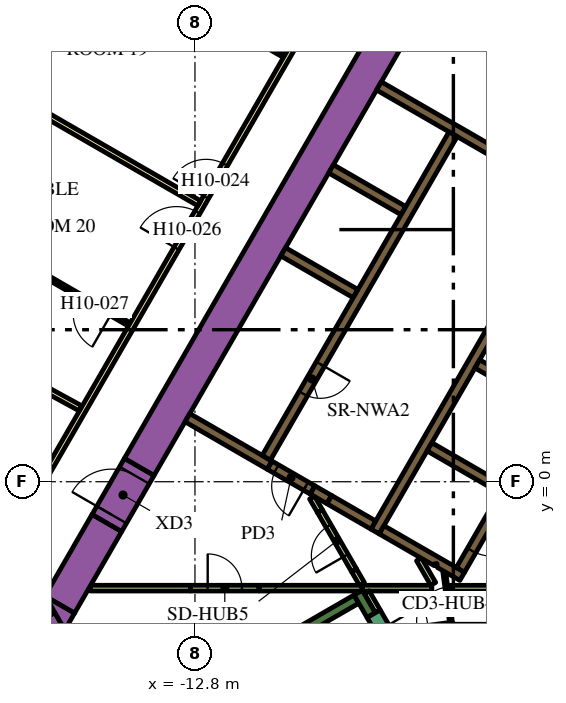
"""IFC4 building model, lengths in metres.
Left out: names, types, materials, properties, quantities, classifications, styles, units other than length and angle.
Written with IfcOpenShell. Run it as: python <this file> out.ifc"""

import sys

from ifc_helpers import new_model, si_unit, direction, frame, frame_2d, origin, place, context, subcontext, project, spatial, polyline, rectangle, outline, extrude, element, fill, save


model = new_model("IFC4")
c1 = context("Model", 3, precision=1e-05, world=origin(), true_north=direction((0.0, 1.0)))
c2 = subcontext(c1, "Body", "Model", "MODEL_VIEW")
j1 = project(units=[si_unit("LENGTHUNIT", "METRE"), si_unit("PLANEANGLEUNIT", "RADIAN")], contexts=[c1])
p1 = place(None, origin())
s1 = spatial("IfcSite", under=j1, at=p1, CompositionType="ELEMENT")
p2 = place(p1, origin())
s2 = spatial("IfcBuilding", under=s1, at=p2, CompositionType="ELEMENT")
p3 = place(p2, frame((0.0, 0.0, 130.5)))
s3 = spatial("IfcBuildingStorey", under=s2, at=p3, CompositionType="ELEMENT", Elevation=130.5)
p4 = place(p3, frame((-14.268, 0.387, 0.0), z_axis=(0.0, 0.0, 1.0), x_axis=(0.499994617707, 0.866028511231, 0.0)))
e1 = element("IfcWall", 1, at=p4, inside=s3, PredefinedType="SOLIDWALL", context=c2, shape_type="SweptSolid", body=[
    extrude(rectangle(XDim=18.817, YDim=0.9, at=frame_2d((9.409, 0.0))), origin(), (0.0, 0.0, 1.0), 3.9),
])
p5 = place(p3, frame((-12.134, -11.883, 0.0), z_axis=(0.0, 0.0, 1.0), x_axis=(-0.500005339912, 0.866022320763, 0.0)))
e2 = element("IfcWall", 2, at=p5, inside=s3, PredefinedType="SOLIDWALL", context=c2, shape_type="SweptSolid", body=[
    extrude(rectangle(XDim=9.488, YDim=0.9, at=frame_2d((4.744, 0.0))), origin(), (0.0, 0.0, 1.0), 3.9),
])
p6 = place(p3, origin())
e3 = element("IfcWall", 3, at=p6, inside=s3, PredefinedType="SOLIDWALL", context=c2, shape_type="SweptSolid", body=[
    extrude(outline(polyline([(-16.489, -3.44), (-17.251, -3.88), (-16.743, -3.0), (-16.489, -3.44)])), origin(), (0.0, 0.0, 1.0), 3.9),
])
p7 = place(p3, frame((-15.118, -1.085, 0.0), z_axis=(0.0, 0.0, 1.0), x_axis=(-0.50006606081, -0.865987260198, 0.0)))
e4 = element("IfcWall", 4, at=p7, inside=s3, PredefinedType="SOLIDWALL", context=c2, shape_type="SweptSolid", body=[
    extrude(rectangle(XDim=2.481, YDim=0.9, at=frame_2d((1.24, 0.0))), origin(), (0.0, 0.0, 1.0), 3.9),
])
e5 = element("IfcWall", 5, at=p6, inside=s3, PredefinedType="SOLIDWALL", context=c2, shape_type="SweptSolid", body=[
    extrude(outline(polyline([(-16.223, -3.9), (-16.732, -3.02), (-15.969, -3.46), (-16.223, -3.9)])), origin(), (0.0, 0.0, 1.0), 3.9),
])
p8 = place(p3, frame((-14.44, -6.49, 0.0), z_axis=(0.0, 0.0, 1.0), x_axis=(0.866022966069, 0.500004222222, 0.0)))
e6 = element("IfcWall", 6, at=p8, inside=s3, PredefinedType="SOLIDWALL", context=c2, shape_type="SweptSolid", body=[
    extrude(rectangle(XDim=6.8, YDim=0.25, at=frame_2d((3.4, 0.0))), origin(), (0.0, 0.0, 1.0), 3.9),
])
p9 = place(p3, frame((-8.163, -3.511, 0.0), z_axis=(0.0, 0.0, 1.0), x_axis=(-0.500206266495, 0.865906283012, 0.0)))
e7 = element("IfcWall", 7, at=p9, inside=s3, PredefinedType="SOLIDWALL", context=c2, shape_type="SweptSolid", body=[
    extrude(rectangle(XDim=0.684, YDim=0.25, at=frame_2d((0.342, 0.0))), origin(), (0.0, 0.0, 1.0), 3.9),
])
p10 = place(p3, frame((-8.06, -1.311, 0.0), z_axis=(0.0, 0.0, 1.0), x_axis=(0.50000273126, 0.866023826885, 0.0)))
e8 = element("IfcWall", 8, at=p10, inside=s3, PredefinedType="SOLIDWALL", context=c2, shape_type="SweptSolid", body=[
    extrude(rectangle(XDim=10.33, YDim=0.25, at=frame_2d((5.165, 0.0))), origin(), (0.0, 0.0, 1.0), 3.9),
])
for number, where, z_axis, x_axis in (
    (9, (-5.369, 3.1, 0.0), (0.0, 0.0, 1.0), (0.866, -0.5, 0.0)),
    (10, (-4.724, -0.182, 0.0), (0.0, 0.0, 1.0), (-0.866, 0.5, 0.0)),
):
    element("IfcWall", number, at=place(p3, frame(where, z_axis=z_axis, x_axis=x_axis)), inside=s3, PredefinedType="SOLIDWALL", context=c2, shape_type="SweptSolid", body=[
        extrude(rectangle(XDim=2.2, YDim=0.25, at=frame_2d((1.1, 0.0))), origin(), (0.0, 0.0, 1.0), 3.9),
    ])
e11 = element("IfcWall", 11, at=p6, inside=s3, PredefinedType="SOLIDWALL", context=c2, shape_type="SweptSolid", body=[
    extrude(outline(polyline([(-5.922, -2.257), (-5.922, -2.257), (-5.705, -2.382), (-5.83, -2.598), (-6.418, -2.258), (-6.433, -2.153), (-6.433, -2.153), (-6.433, -2.153), (-6.508, -2.163), (-6.508, -2.163), (-6.508, -2.163), (-6.501, -2.21), (-7.952, -1.373), (-7.827, -1.156), (-5.922, -2.257)])), origin(), (0.0, 0.0, 1.0), 3.9),
])
p11 = place(p3, frame((-9.708, -0.215, 0.0), z_axis=(0.0, 0.0, 1.0), x_axis=(0.866113839764, -0.499846793097, 0.0)))
e12 = element("IfcWall", 12, at=p11, inside=s3, PredefinedType="SOLIDWALL", context=c2, shape_type="SweptSolid", body=[
    extrude(rectangle(XDim=0.51, YDim=0.25, at=frame_2d((0.255, 0.0))), origin(), (0.0, 0.0, 1.0), 3.9),
])
p12 = place(p3, frame((-12.999, 1.685, 0.0), z_axis=(0.0, 0.0, 1.0), x_axis=(0.865996765544, -0.500049599607, 0.0)))
e13 = element("IfcWall", 13, at=p12, inside=s3, PredefinedType="SOLIDWALL", context=c2, shape_type="SweptSolid", body=[
    extrude(rectangle(XDim=2.498, YDim=0.25, at=frame_2d((1.249, 0.0))), origin(), (0.0, 0.0, 1.0), 3.9),
])
p13 = place(p3, frame((-9.265, -0.471, 0.0), z_axis=(0.0, 0.0, 1.0), x_axis=(0.865954634268, -0.500122556369, 0.0)))
e14 = element("IfcWall", 14, at=p13, inside=s3, PredefinedType="SOLIDWALL", context=c2, shape_type="SweptSolid", body=[
    extrude(rectangle(XDim=1.338, YDim=0.25, at=frame_2d((0.669, 0.0))), origin(), (0.0, 0.0, 1.0), 3.9),
])
for number, where, z_axis, x_axis in (
    (15, (-8.574, 4.95, 0.0), (0.0, 0.0, 1.0), (-0.866, 0.5, 0.0)),
    (16, (-7.314, 7.132, 0.0), (0.0, 0.0, 1.0), (-0.866, 0.5, 0.0)),
):
    element("IfcWall", number, at=place(p3, frame(where, z_axis=z_axis, x_axis=x_axis)), inside=s3, PredefinedType="SOLIDWALL", context=c2, shape_type="SweptSolid", body=[
        extrude(rectangle(XDim=2.2, YDim=0.25, at=frame_2d((1.1, 0.0))), origin(), (0.0, 0.0, 1.0), 3.9),
    ])
p14 = place(p3, frame((-7.959, 10.415, 0.0), z_axis=(0.0, 0.0, 1.0), x_axis=(0.866020958405, -0.500007699544, 0.0)))
e17 = element("IfcWall", 17, at=p14, inside=s3, PredefinedType="SOLIDWALL", context=c2, shape_type="SweptSolid", body=[
    extrude(rectangle(XDim=4.1, YDim=0.25, at=frame_2d((2.05, 0.0))), origin(), (0.0, 0.0, 1.0), 3.9),
])
p15 = place(p3, frame((-12.915, -2.8, 0.0), z_axis=(0.0, 0.0, 1.0), x_axis=(-1.0, 0.0, 0.0)))
e18 = element("IfcWall", 18, at=p15, inside=s3, PredefinedType="PARTITIONING", context=c2, shape_type="SweptSolid", body=[
    extrude(rectangle(XDim=2.637, YDim=0.15, at=frame_2d((1.318, 0.0))), origin(), (0.0, 0.0, 1.0), 2.6),
])
p16 = place(p3, frame((-8.395, -2.8, 0.0), z_axis=(0.0, 0.0, 1.0), x_axis=(1.0, 0.0, 0.0)))
e19 = element("IfcWall", 19, at=p16, inside=s3, PredefinedType="PARTITIONING", context=c2, shape_type="SweptSolid", body=[
    extrude(rectangle(XDim=1.828, YDim=0.15, at=frame_2d((0.914, 0.0))), origin(), (0.0, 0.0, 1.0), 2.6),
])
p17 = place(p3, frame((-11.115, -2.8, 0.0), z_axis=(0.0, 0.0, 1.0), x_axis=(1.0, 0.0, 0.0)))
e20 = element("IfcWall", 20, at=p17, inside=s3, PredefinedType="PARTITIONING", context=c2, shape_type="SweptSolid", body=[
    extrude(rectangle(XDim=2.708, YDim=0.15, at=frame_2d((1.354, 0.0))), origin(), (0.0, 0.0, 1.0), 2.6),
])
p18 = place(p3, frame((-6.531, -2.689, 0.0), z_axis=(0.0, 0.0, 1.0), x_axis=(-0.499967446111, 0.866044197965, 0.0)))
e21 = element("IfcWall", 21, at=p18, inside=s3, PredefinedType="PARTITIONING", context=c2, shape_type="SweptSolid", body=[
    extrude(rectangle(XDim=0.748, YDim=0.15, at=frame_2d((0.374, 0.0))), origin(), (0.0, 0.0, 1.0), 2.6),
])
p19 = place(p3, frame((-7.99, -3.412, 0.0), z_axis=(0.0, 0.0, 1.0), x_axis=(-0.500193841991, 0.86591346013, 0.0)))
e22 = element("IfcWall", 22, at=p19, inside=s3, PredefinedType="PARTITIONING", context=c2, shape_type="SweptSolid", body=[
    extrude(rectangle(XDim=0.583, YDim=0.15, at=frame_2d((0.292, 0.0))), origin(), (0.0, 0.0, 1.0), 2.6),
])
p20 = place(p3, frame((-8.612, -2.333, 0.0), z_axis=(0.0, 0.0, 1.0), x_axis=(0.500248216681, -0.86588204838, 0.0)))
e23 = element("IfcWall", 23, at=p20, inside=s3, PredefinedType="PARTITIONING", context=c2, shape_type="SweptSolid", body=[
    extrude(rectangle(XDim=0.415, YDim=0.15, at=frame_2d((0.208, 0.0))), origin(), (0.0, 0.0, 1.0), 2.6),
])
p21 = place(p3, frame((-6.086, -2.801, 0.0), z_axis=(0.0, 0.0, 1.0), x_axis=(1.0, 0.0, 0.0)))
e24 = element("IfcWall", 24, at=p21, inside=s3, PredefinedType="PARTITIONING", context=c2, shape_type="SweptSolid", body=[
    extrude(rectangle(XDim=7.524, YDim=0.15, at=frame_2d((3.762, 0.0))), origin(), (0.0, 0.0, 1.0), 2.6),
])
p22 = place(p3, frame((-9.512, -0.775, 0.0), z_axis=(0.0, 0.0, 1.0), x_axis=(-0.500080620599, 0.865978852456, 0.0)))
e25 = element("IfcWall", 25, at=p22, inside=s3, PredefinedType="PARTITIONING", context=c2, shape_type="SweptSolid", body=[
    extrude(rectangle(XDim=0.413, YDim=0.15, at=frame_2d((0.207, 0.0))), origin(), (0.0, 0.0, 1.0), 2.6),
])
p23 = place(p3, frame((-6.008, 9.144, 0.0), z_axis=(0.0, 0.0, 1.0), x_axis=(-0.500006956611, -0.866021387346, 0.0)))
e26 = element("IfcWall", 26, at=p23, inside=s3, PredefinedType="SOLIDWALL", context=c2, shape_type="SweptSolid", body=[
    extrude(rectangle(XDim=9.83, YDim=0.25, at=frame_2d((4.915, 0.0))), origin(), (0.0, 0.0, 1.0), 3.9),
])
p24 = place(p23, frame((6.985, 0.0, 0.0)))
e27 = element("IfcOpeningElement", 27, at=p24, cuts=e26, PredefinedType="OPENING", context=c2, shape_type="SweptSolid", body=[
    extrude(rectangle(XDim=0.9, YDim=2.1, at=frame_2d((0.45, 1.05))), frame((0.0, 0.135, 0.0), z_axis=(0.0, -1.0, 0.0), x_axis=(1.0, 0.0, 0.0)), (0.0, 0.0, 1.0), 0.27),
])
p25 = place(p3, frame((-0.898, 6.194, 0.0), z_axis=(0.0, 0.0, 1.0), x_axis=(-0.499996202215, -0.866027596426, 0.0)))
e28 = element("IfcWall", 28, at=p25, inside=s3, PredefinedType="SOLIDWALL", context=c2, shape_type="SweptSolid", body=[
    extrude(rectangle(XDim=9.83, YDim=0.25, at=frame_2d((4.915, 0.0))), origin(), (0.0, 0.0, 1.0), 3.9),
])
p26 = place(p25, frame((0.585, 0.0, 0.0)))
e29 = element("IfcOpeningElement", 29, at=p26, cuts=e28, PredefinedType="OPENING", context=c2, shape_type="SweptSolid", body=[
    extrude(rectangle(XDim=1.1, YDim=2.1, at=frame_2d((0.55, 1.05))), frame((0.0, 0.135, 0.0), z_axis=(0.0, -1.0, 0.0), x_axis=(1.0, 0.0, 0.0)), (0.0, 0.0, 1.0), 0.27),
])
p27 = place(p25, frame((3.105, 0.0, 0.0)))
e30 = element("IfcOpeningElement", 30, at=p27, cuts=e28, PredefinedType="OPENING", context=c2, shape_type="SweptSolid", body=[
    extrude(rectangle(XDim=1.1, YDim=2.1, at=frame_2d((0.55, 1.05))), frame((0.0, 0.135, 0.0), z_axis=(0.0, -1.0, 0.0), x_axis=(1.0, 0.0, 0.0)), (0.0, 0.0, 1.0), 0.27),
])
p28 = place(p25, frame((5.625, 0.0, 0.0)))
e31 = element("IfcOpeningElement", 31, at=p28, cuts=e28, PredefinedType="OPENING", context=c2, shape_type="SweptSolid", body=[
    extrude(rectangle(XDim=1.1, YDim=2.1, at=frame_2d((0.55, 1.05))), frame((0.0, 0.135, 0.0), z_axis=(0.0, -1.0, 0.0), x_axis=(1.0, 0.0, 0.0)), (0.0, 0.0, 1.0), 0.27),
])
p29 = place(p25, frame((8.145, 0.0, 0.0)))
e32 = element("IfcOpeningElement", 32, at=p29, cuts=e28, PredefinedType="OPENING", context=c2, shape_type="SweptSolid", body=[
    extrude(rectangle(XDim=1.1, YDim=2.1, at=frame_2d((0.55, 1.05))), frame((0.0, 0.135, 0.0), z_axis=(0.0, -1.0, 0.0), x_axis=(1.0, 0.0, 0.0)), (0.0, 0.0, 1.0), 0.27),
])
p30 = place(p3, frame((-8.098, -3.474, 0.0), z_axis=(0.0, 0.0, 1.0), x_axis=(0.49994051562, -0.866059744384, 0.0)))
e33 = element("IfcWall", 33, at=p30, inside=s3, PredefinedType="SOLIDWALL", context=c2, shape_type="SweptSolid", body=[
    extrude(rectangle(XDim=2.1, YDim=0.4, at=frame_2d((1.05, 0.0))), origin(), (0.0, 0.0, 1.0), 3.9),
])
p31 = place(p30, frame((0.45, 0.0, 0.0)))
e34 = element("IfcOpeningElement", 34, at=p31, cuts=e33, PredefinedType="OPENING", context=c2, shape_type="SweptSolid", body=[
    extrude(rectangle(XDim=1.2, YDim=2.1, at=frame_2d((0.6, 1.05))), frame((0.0, 0.21, 0.0), z_axis=(0.0, -1.0, 0.0), x_axis=(1.0, 0.0, 0.0)), (0.0, 0.0, 1.0), 0.42),
])
p32 = place(p3, frame((-9.708, -0.215, 0.0), z_axis=(0.0, 0.0, 1.0), x_axis=(-0.866004217611, 0.500036693733, 0.0)))
e35 = element("IfcWall", 35, at=p32, inside=s3, PredefinedType="SOLIDWALL", context=c2, shape_type="SweptSolid", body=[
    extrude(rectangle(XDim=1.3, YDim=0.25, at=frame_2d((0.65, 0.0))), origin(), (0.0, 0.0, 1.0), 3.9),
])
p33 = place(p32, frame((0.2, 0.0, 0.0)))
e36 = element("IfcOpeningElement", 36, at=p33, cuts=e35, PredefinedType="OPENING", context=c2, shape_type="SweptSolid", body=[
    extrude(rectangle(XDim=0.9, YDim=2.1, at=frame_2d((0.45, 1.05))), frame((0.0, 0.135, 0.0), z_axis=(0.0, -1.0, 0.0), x_axis=(1.0, 0.0, 0.0)), (0.0, 0.0, 1.0), 0.27),
])
p34 = place(p3, frame((-5.995, -4.213, 0.0), z_axis=(0.0, 0.0, 1.0), x_axis=(-0.132072335448, 0.991240081014, 0.0)))
e37 = element("IfcWall", 37, at=p34, inside=s3, PredefinedType="PARTITIONING", context=c2, shape_type="SweptSolid", body=[
    extrude(rectangle(XDim=2.1, YDim=0.076, at=frame_2d((1.05, 0.0))), origin(), (0.0, 0.0, 1.0), 2.6),
])
p35 = place(p34, frame((0.55, 0.0, 0.0)))
e38 = element("IfcOpeningElement", 38, at=p35, cuts=e37, PredefinedType="OPENING", context=c2, shape_type="SweptSolid", body=[
    extrude(rectangle(XDim=0.9, YDim=2.1, at=frame_2d((0.45, 1.05))), frame((0.0, 0.048, 0.0), z_axis=(0.0, -1.0, 0.0), x_axis=(1.0, 0.0, 0.0)), (0.0, 0.0, 1.0), 0.096),
])
p36 = place(p3, frame((-15.118, -1.085, 0.0), z_axis=(0.0, 0.0, 1.0), x_axis=(0.500000056704, 0.866025371046, 0.0)))
e39 = element("IfcWall", 39, at=p36, inside=s3, PredefinedType="SOLIDWALL", context=c2, shape_type="SweptSolid", body=[
    extrude(rectangle(XDim=1.7, YDim=0.9, at=frame_2d((0.85, 0.0))), origin(), (0.0, 0.0, 1.0), 3.9),
])
p37 = place(p36, frame((0.25, 0.0, 0.0)))
e40 = element("IfcOpeningElement", 40, at=p37, cuts=e39, PredefinedType="OPENING", context=c2, shape_type="SweptSolid", body=[
    extrude(rectangle(XDim=1.2, YDim=2.1, at=frame_2d((0.6, 1.05))), frame((0.0, 0.46, 0.0), z_axis=(0.0, -1.0, 0.0), x_axis=(1.0, 0.0, 0.0)), (0.0, 0.0, 1.0), 0.92),
])
p38 = place(p3, frame((-12.915, -2.8, 0.0), z_axis=(0.0, 0.0, 1.0), x_axis=(1.0, 0.0, 0.0)))
e41 = element("IfcWall", 41, at=p38, inside=s3, PredefinedType="PARTITIONING", context=c2, shape_type="SweptSolid", body=[
    extrude(rectangle(XDim=1.8, YDim=0.15, at=frame_2d((0.9, 0.0))), origin(), (0.0, 0.0, 1.0), 2.6),
])
p39 = place(p38, frame((0.45, 0.0, 0.0)))
e42 = element("IfcOpeningElement", 42, at=p39, cuts=e41, PredefinedType="OPENING", context=c2, shape_type="SweptSolid", body=[
    extrude(rectangle(XDim=0.9, YDim=2.1, at=frame_2d((0.45, 1.05))), frame((0.0, 0.085, 0.0), z_axis=(0.0, -1.0, 0.0), x_axis=(1.0, 0.0, 0.0)), (0.0, 0.0, 1.0), 0.17),
])
p40 = place(p3, frame((-8.612, -2.333, 0.0), z_axis=(0.0, 0.0, 1.0), x_axis=(-0.499961193289, 0.866047807691, 0.0)))
e43 = element("IfcWall", 43, at=p40, inside=s3, PredefinedType="PARTITIONING", context=c2, shape_type="SweptSolid", body=[
    extrude(rectangle(XDim=1.8, YDim=0.15, at=frame_2d((0.9, 0.0))), origin(), (0.0, 0.0, 1.0), 2.6),
])
p41 = place(p40, frame((0.45, 0.0, 0.0)))
e44 = element("IfcOpeningElement", 44, at=p41, cuts=e43, PredefinedType="OPENING", context=c2, shape_type="SweptSolid", body=[
    extrude(rectangle(XDim=0.9, YDim=2.1, at=frame_2d((0.45, 1.05))), frame((0.0, 0.085, 0.0), z_axis=(0.0, -1.0, 0.0), x_axis=(1.0, 0.0, 0.0)), (0.0, 0.0, 1.0), 0.17),
])
p42 = place(p3, frame((-19.081, -3.9, 0.0), z_axis=(0.0, 0.0, 1.0), x_axis=(0.499998313975, 0.866026377209, 0.0)))
e45 = element("IfcWall", 45, at=p42, inside=s3, PredefinedType="PARTITIONING", context=c2, shape_type="SweptSolid", body=[
    extrude(rectangle(XDim=25.766, YDim=0.15, at=frame_2d((12.883, 0.0))), origin(), (0.0, 0.0, 1.0), 2.6),
])
p43 = place(p42, frame((24.141, 0.0, 0.0)))
e46 = element("IfcOpeningElement", 46, at=p43, cuts=e45, PredefinedType="OPENING", context=c2, shape_type="SweptSolid", body=[
    extrude(rectangle(XDim=1.1, YDim=2.1, at=frame_2d((0.55, 1.05))), frame((0.0, 0.085, 0.0), z_axis=(0.0, -1.0, 0.0), x_axis=(1.0, 0.0, 0.0)), (0.0, 0.0, 1.0), 0.17),
])
p44 = place(p42, frame((13.144, 0.0, 0.0)))
e47 = element("IfcOpeningElement", 47, at=p44, cuts=e45, PredefinedType="OPENING", context=c2, shape_type="SweptSolid", body=[
    extrude(rectangle(XDim=1.0, YDim=2.1, at=frame_2d((0.5, 1.05))), frame((0.0, 0.085, 0.0), z_axis=(0.0, -1.0, 0.0), x_axis=(1.0, 0.0, 0.0)), (0.0, 0.0, 1.0), 0.17),
])
p45 = place(p42, frame((11.593, 0.0, 0.0)))
e48 = element("IfcOpeningElement", 48, at=p45, cuts=e45, PredefinedType="OPENING", context=c2, shape_type="SweptSolid", body=[
    extrude(rectangle(XDim=1.1, YDim=2.1, at=frame_2d((0.55, 1.05))), frame((0.0, 0.085, 0.0), z_axis=(0.0, -1.0, 0.0), x_axis=(1.0, 0.0, 0.0)), (0.0, 0.0, 1.0), 0.17),
])
p46 = place(p42, frame((0.596, 0.0, 0.0)))
e49 = element("IfcOpeningElement", 49, at=p46, cuts=e45, PredefinedType="OPENING", context=c2, shape_type="SweptSolid", body=[
    extrude(rectangle(XDim=1.0, YDim=2.1, at=frame_2d((0.5, 1.05))), frame((0.0, 0.085, 0.0), z_axis=(0.0, -1.0, 0.0), x_axis=(1.0, 0.0, 0.0)), (0.0, 0.0, 1.0), 0.17),
])
p47 = place(p3, frame((-21.614, 5.102, 0.0), z_axis=(0.0, 0.0, 1.0), x_axis=(0.877484555087, -0.479604895287, 0.0)))
e50 = element("IfcWall", 50, at=p47, inside=s3, PredefinedType="PARTITIONING", context=c2, shape_type="SweptSolid", body=[
    extrude(rectangle(XDim=6.611, YDim=0.15, at=frame_2d((3.306, 0.0))), origin(), (0.0, 0.0, 1.0), 2.6),
])
p48 = place(p3, frame((-18.484, 10.672, 0.0), z_axis=(0.0, 0.0, 1.0), x_axis=(0.866019162053, -0.50001081084, 0.0)))
e51 = element("IfcWall", 51, at=p48, inside=s3, PredefinedType="PARTITIONING", context=c2, shape_type="SweptSolid", body=[
    extrude(rectangle(XDim=6.694, YDim=0.15, at=frame_2d((3.347, 0.0))), origin(), (0.0, 0.0, 1.0), 2.6),
])
p49 = place(p3, frame((-12.698, 12.506, 0.0), z_axis=(0.0, 0.0, 1.0), x_axis=(0.865997922154, -0.500047596559, 0.0)))
e52 = element("IfcWall", 52, at=p49, inside=s3, PredefinedType="PARTITIONING", context=c2, shape_type="SweptSolid", body=[
    extrude(rectangle(XDim=2.6, YDim=0.1, at=frame_2d((1.3, 0.0))), origin(), (0.0, 0.0, 1.0), 2.6),
])
p50 = place(p49, frame((1.1, 0.0, 0.0)))
e53 = element("IfcOpeningElement", 53, at=p50, cuts=e52, PredefinedType="OPENING", context=c2, shape_type="SweptSolid", body=[
    extrude(rectangle(XDim=0.9, YDim=2.1, at=frame_2d((0.45, 1.05))), frame((0.0, 0.06, 0.0), z_axis=(0.0, -1.0, 0.0), x_axis=(1.0, 0.0, 0.0)), (0.0, 0.0, 1.0), 0.12),
])
p51 = place(p3, frame((-14.527, 4.138, 0.0), z_axis=(0.0, 0.0, 1.0), x_axis=(-0.866018616679, 0.500011755427, 0.0)))
e54 = element("IfcWall", 54, at=p51, inside=s3, PredefinedType="PARTITIONING", context=c2, shape_type="SweptSolid", body=[
    extrude(rectangle(XDim=2.8, YDim=0.1, at=frame_2d((1.4, 0.0))), origin(), (0.0, 0.0, 1.0), 2.6),
])
p52 = place(p51, frame((0.55, 0.0, 0.0)))
e55 = element("IfcOpeningElement", 55, at=p52, cuts=e54, PredefinedType="OPENING", context=c2, shape_type="SweptSolid", body=[
    extrude(rectangle(XDim=1.0, YDim=2.1, at=frame_2d((0.5, 1.05))), frame((0.0, 0.06, 0.0), z_axis=(0.0, -1.0, 0.0), x_axis=(1.0, 0.0, 0.0)), (0.0, 0.0, 1.0), 0.12),
])
p53 = place(p24, origin())
e56 = element("IfcDoor", 56, at=p53, inside=s3, OperationType="SINGLE_SWING_LEFT", PredefinedType="DOOR", context=c2, shape_type="SweptSolid", body=[
    extrude(rectangle(XDim=0.9, YDim=2.1, at=frame_2d((0.45, 1.05))), frame((0.0, 0.025, 0.0), z_axis=(0.0, -1.0, 0.0), x_axis=(1.0, 0.0, 0.0)), (0.0, 0.0, 1.0), 0.05),
])
fill(e27, e56)
p54 = place(p29, origin())
e57 = element("IfcDoor", 57, at=p54, inside=s3, OperationType="DOUBLE_DOOR_SLIDING", PredefinedType="DOOR", context=c2, shape_type="SweptSolid", body=[
    extrude(rectangle(XDim=1.1, YDim=2.1, at=frame_2d((0.55, 1.05))), frame((0.0, 0.025, 0.0), z_axis=(0.0, -1.0, 0.0), x_axis=(1.0, 0.0, 0.0)), (0.0, 0.0, 1.0), 0.05),
])
fill(e32, e57)
p55 = place(p33, origin())
e58 = element("IfcDoor", 58, at=p55, inside=s3, OperationType="SINGLE_SWING_LEFT", PredefinedType="DOOR", context=c2, shape_type="SweptSolid", body=[
    extrude(rectangle(XDim=0.9, YDim=2.1, at=frame_2d((0.45, 1.05))), frame((0.0, 0.025, 0.0), z_axis=(0.0, -1.0, 0.0), x_axis=(1.0, 0.0, 0.0)), (0.0, 0.0, 1.0), 0.05),
])
fill(e36, e58)
p56 = place(p35, origin())
e59 = element("IfcDoor", 59, at=p56, inside=s3, OperationType="SINGLE_SWING_LEFT", PredefinedType="DOOR", context=c2, shape_type="SweptSolid", body=[
    extrude(rectangle(XDim=0.9, YDim=2.1, at=frame_2d((0.45, 1.05))), frame((0.0, 0.025, 0.0), z_axis=(0.0, -1.0, 0.0), x_axis=(1.0, 0.0, 0.0)), (0.0, 0.0, 1.0), 0.05),
])
fill(e38, e59)
p57 = place(p37, origin())
e60 = element("IfcDoor", 60, at=p57, inside=s3, OperationType="SINGLE_SWING_LEFT", PredefinedType="DOOR", context=c2, shape_type="SweptSolid", body=[
    extrude(rectangle(XDim=1.2, YDim=2.1, at=frame_2d((0.6, 1.05))), frame((0.0, 0.025, 0.0), z_axis=(0.0, -1.0, 0.0), x_axis=(1.0, 0.0, 0.0)), (0.0, 0.0, 1.0), 0.05),
])
fill(e40, e60)
p58 = place(p39, origin())
e61 = element("IfcDoor", 61, at=p58, inside=s3, OperationType="SINGLE_SWING_LEFT", PredefinedType="DOOR", context=c2, shape_type="SweptSolid", body=[
    extrude(rectangle(XDim=0.9, YDim=2.1, at=frame_2d((0.45, 1.05))), frame((0.0, 0.025, 0.0), z_axis=(0.0, -1.0, 0.0), x_axis=(1.0, 0.0, 0.0)), (0.0, 0.0, 1.0), 0.05),
])
fill(e42, e61)
p59 = place(p41, origin())
e62 = element("IfcDoor", 62, at=p59, inside=s3, OperationType="SINGLE_SWING_LEFT", PredefinedType="DOOR", context=c2, shape_type="SweptSolid", body=[
    extrude(rectangle(XDim=0.9, YDim=2.1, at=frame_2d((0.45, 1.05))), frame((0.0, 0.025, 0.0), z_axis=(0.0, -1.0, 0.0), x_axis=(1.0, 0.0, 0.0)), (0.0, 0.0, 1.0), 0.05),
])
fill(e44, e62)
p60 = place(p44, origin())
e63 = element("IfcDoor", 63, at=p60, inside=s3, OperationType="SINGLE_SWING_LEFT", PredefinedType="DOOR", context=c2, shape_type="SweptSolid", body=[
    extrude(rectangle(XDim=1.0, YDim=2.1, at=frame_2d((0.5, 1.05))), frame((0.0, 0.025, 0.0), z_axis=(0.0, -1.0, 0.0), x_axis=(1.0, 0.0, 0.0)), (0.0, 0.0, 1.0), 0.05),
])
fill(e47, e63)
p61 = place(p45, origin())
e64 = element("IfcDoor", 64, at=p61, inside=s3, OperationType="SINGLE_SWING_RIGHT", PredefinedType="DOOR", context=c2, shape_type="SweptSolid", body=[
    extrude(rectangle(XDim=1.1, YDim=2.1, at=frame_2d((0.55, 1.05))), frame((0.0, 0.025, 0.0), z_axis=(0.0, -1.0, 0.0), x_axis=(1.0, 0.0, 0.0)), (0.0, 0.0, 1.0), 0.05),
])
fill(e48, e64)
p62 = place(p52, origin())
e65 = element("IfcDoor", 65, at=p62, inside=s3, OperationType="SINGLE_SWING_LEFT", PredefinedType="DOOR", context=c2, shape_type="SweptSolid", body=[
    extrude(rectangle(XDim=1.0, YDim=2.1, at=frame_2d((0.5, 1.05))), frame((0.0, 0.025, 0.0), z_axis=(0.0, -1.0, 0.0), x_axis=(1.0, 0.0, 0.0)), (0.0, 0.0, 1.0), 0.05),
])
fill(e55, e65)
save(model, sys.argv[1])
